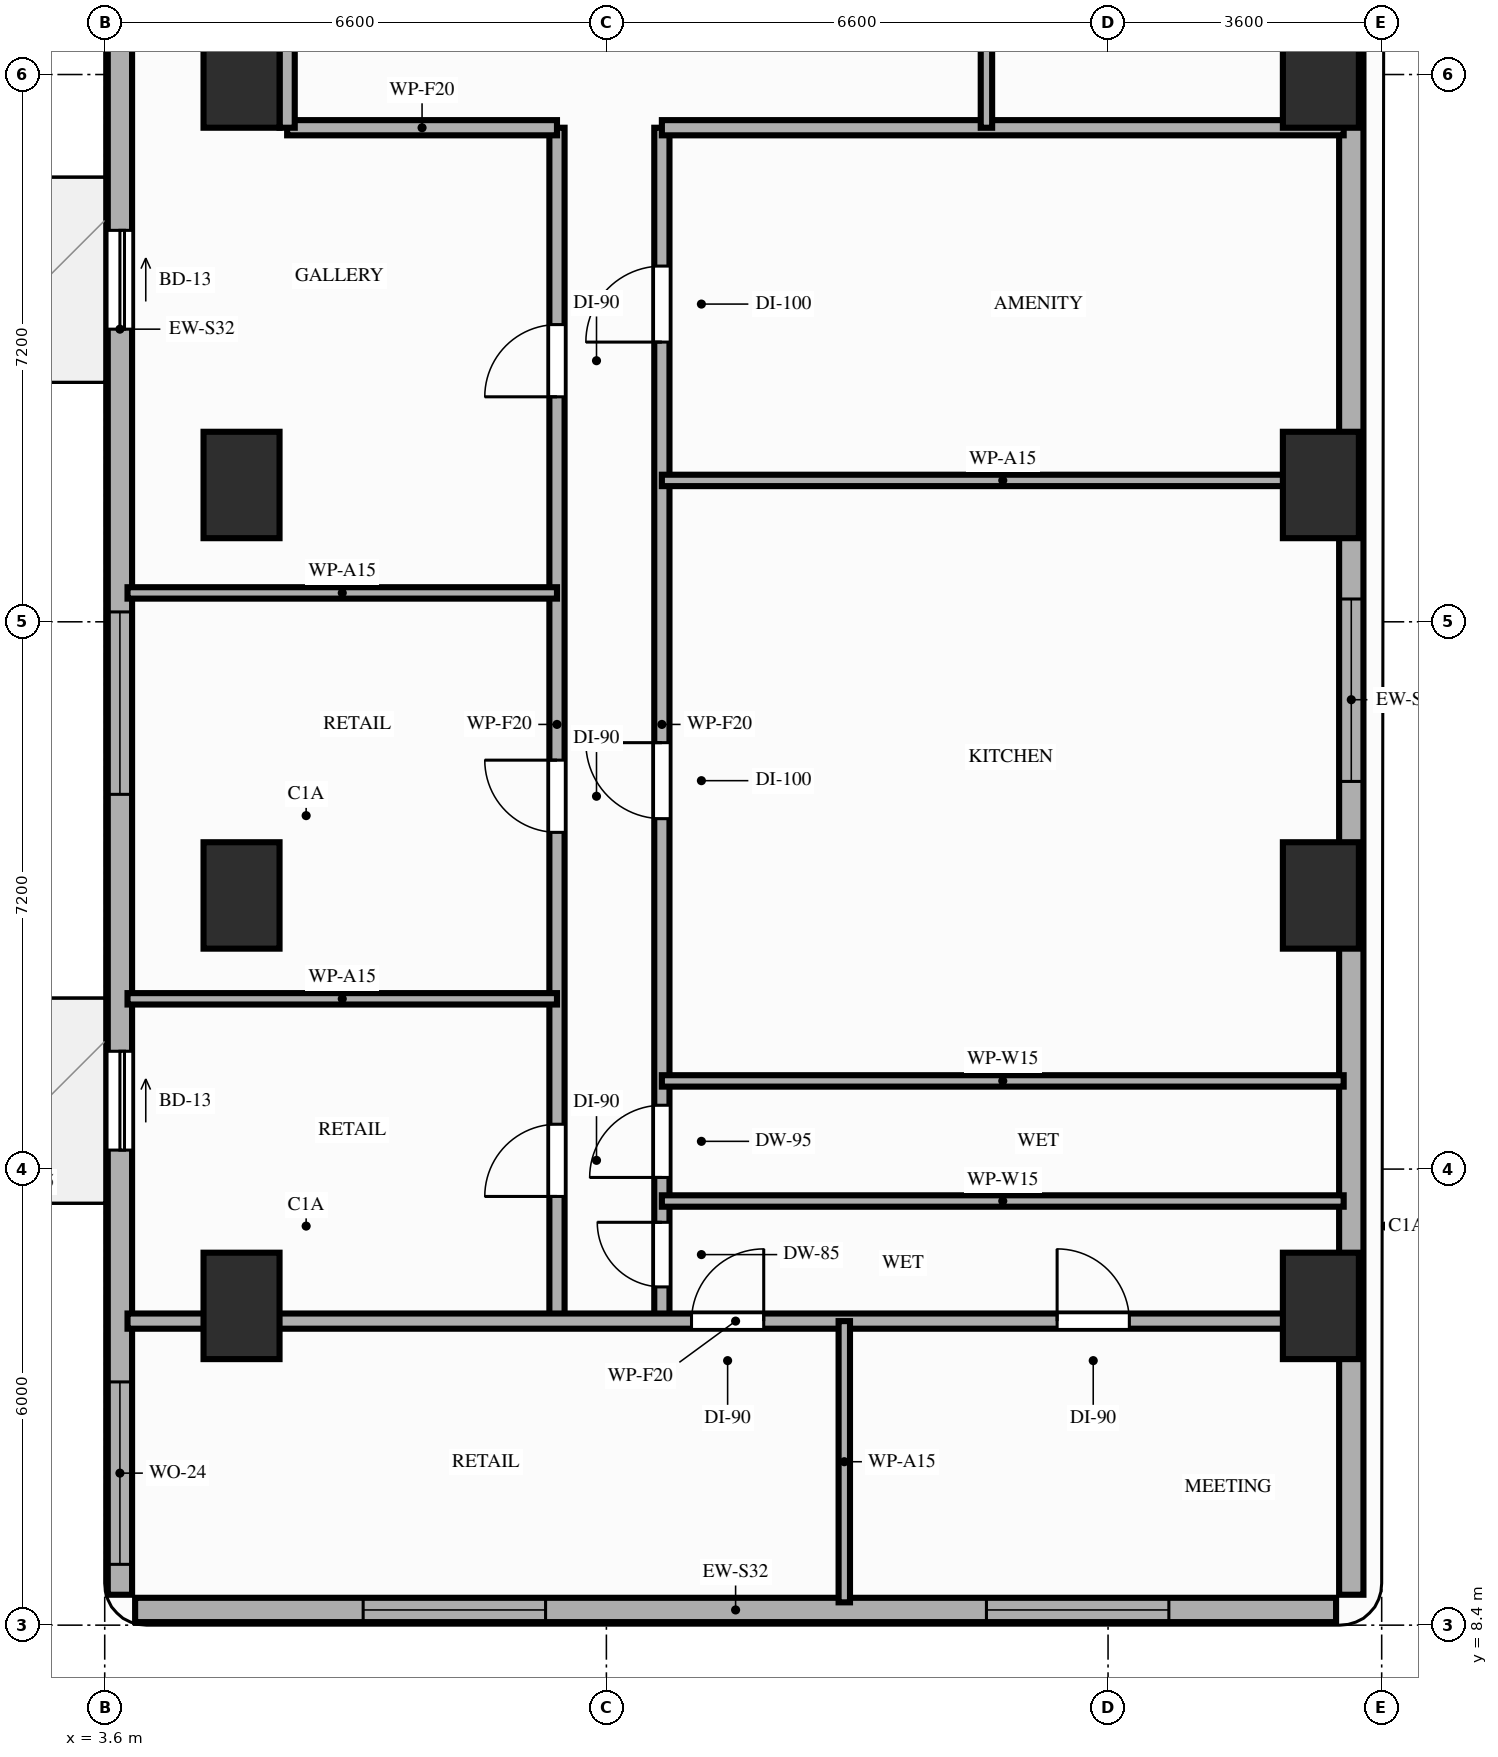
"""IFC4 building model, lengths in metres.
Left out: names, types, materials, properties, quantities, classifications, styles, units other than length and angle.
Written with IfcOpenShell. Run it as: python <this file> out.ifc"""

import sys

from ifc_helpers import new_model, si_unit, direction, frame, frame_2d, origin, origin_2d, place, context, subcontext, project, spatial, rectangle, extrude, element, fill, save


model = new_model("IFC4")
c1 = context("Model", 3, precision=1e-05, world=origin(), true_north=direction((0.0, 1.0)))
c2 = subcontext(c1, "Body", "Model", "MODEL_VIEW")
j1 = project(units=[si_unit("LENGTHUNIT", "METRE"), si_unit("PLANEANGLEUNIT", "RADIAN")], contexts=[c1])
p1 = place(None, origin())
s1 = spatial("IfcSite", under=j1, at=p1, CompositionType="ELEMENT")
p2 = place(p1, origin())
s2 = spatial("IfcBuilding", under=s1, at=p2, CompositionType="ELEMENT")
p3 = place(p2, frame((0.0, 0.0, 36.6)))
s3 = spatial("IfcBuildingStorey", under=s2, at=p3, CompositionType="ELEMENT", Elevation=36.6)
for number, where, z_axis, x_axis in (
    (1, (5.4, 12.6, 0.0), (0.0, 0.0, 1.0), (1.0, 0.0, 0.0)),
    (2, (19.6, 12.6, 0.0), (0.0, 0.0, 1.0), (1.0, 0.0, 0.0)),
    (3, (5.4, 18.0, 0.0), (0.0, 0.0, 1.0), (1.0, 0.0, 0.0)),
    (4, (19.6, 18.0, 0.0), (0.0, 0.0, 1.0), (1.0, 0.0, 0.0)),
    (5, (5.4, 23.4, 0.0), (0.0, 0.0, 1.0), (1.0, 0.0, 0.0)),
    (6, (19.6, 23.4, 0.0), (0.0, 0.0, 1.0), (1.0, 0.0, 0.0)),
    (7, (5.4, 28.8, 0.0), (0.0, 0.0, 1.0), (1.0, 0.0, 0.0)),
    (8, (19.6, 28.8, 0.0), (0.0, 0.0, 1.0), (1.0, 0.0, 0.0)),
):
    element("IfcColumn", number, at=place(p3, frame(where, z_axis=z_axis, x_axis=x_axis)), inside=s3, PredefinedType="COLUMN", context=c2, shape_type="SweptSolid", body=[
        extrude(rectangle(XDim=1.0, YDim=1.4, at=origin_2d()), origin(), (0.0, 0.0, 1.0), 3.2),
    ])
p4 = place(p3, frame((4.0, 8.6, 0.0), z_axis=(0.0, 0.0, 1.0), x_axis=(1.0, 0.0, 0.0)))
e9 = element("IfcWall", 9, at=p4, inside=s3, PredefinedType="STANDARD", context=c2, shape_type="SweptSolid", body=[
    extrude(rectangle(XDim=15.8, YDim=0.32, at=frame_2d((7.9, 0.0))), origin(), (0.0, 0.0, 1.0), 2.96),
])
p5 = place(p4, frame((3.0, 0.0, 0.85)))
e10 = element("IfcOpeningElement", 10, at=p5, cuts=e9, PredefinedType="OPENING", context=c2, shape_type="SweptSolid", body=[
    extrude(rectangle(XDim=2.4, YDim=1.8, at=frame_2d((1.2, 0.9))), frame((0.0, 0.17, 0.0), z_axis=(0.0, -1.0, 0.0), x_axis=(1.0, 0.0, 0.0)), (0.0, 0.0, 1.0), 0.34),
])
p6 = place(p4, frame((11.2, 0.0, 0.85)))
e11 = element("IfcOpeningElement", 11, at=p6, cuts=e9, PredefinedType="OPENING", context=c2, shape_type="SweptSolid", body=[
    extrude(rectangle(XDim=2.4, YDim=1.8, at=frame_2d((1.2, 0.9))), frame((0.0, 0.17, 0.0), z_axis=(0.0, -1.0, 0.0), x_axis=(1.0, 0.0, 0.0)), (0.0, 0.0, 1.0), 0.34),
])
p7 = place(p3, frame((3.8, 42.1, 0.0), z_axis=(0.0, 0.0, 1.0), x_axis=(0.0, -1.0, 0.0)))
e12 = element("IfcWall", 12, at=p7, inside=s3, PredefinedType="STANDARD", context=c2, shape_type="SweptSolid", body=[
    extrude(rectangle(XDim=33.3, YDim=0.32, at=frame_2d((16.65, 0.0))), origin(), (0.0, 0.0, 1.0), 2.67),
])
p8 = place(p7, frame((26.15, 0.0, 0.0)))
e13 = element("IfcOpeningElement", 13, at=p8, cuts=e12, PredefinedType="OPENING", context=c2, shape_type="SweptSolid", body=[
    extrude(rectangle(XDim=1.3, YDim=2.08, at=frame_2d((0.65, 1.04))), frame((0.0, 0.17, 0.0), z_axis=(0.0, -1.0, 0.0), x_axis=(1.0, 0.0, 0.0)), (0.0, 0.0, 1.0), 0.34),
])
p9 = place(p7, frame((15.35, 0.0, 0.0)))
e14 = element("IfcOpeningElement", 14, at=p9, cuts=e12, PredefinedType="OPENING", context=c2, shape_type="SweptSolid", body=[
    extrude(rectangle(XDim=1.3, YDim=2.08, at=frame_2d((0.65, 1.04))), frame((0.0, 0.17, 0.0), z_axis=(0.0, -1.0, 0.0), x_axis=(1.0, 0.0, 0.0)), (0.0, 0.0, 1.0), 0.34),
])
p10 = place(p7, frame((30.5, 0.0, 0.85)))
e15 = element("IfcOpeningElement", 15, at=p10, cuts=e12, PredefinedType="OPENING", context=c2, shape_type="SweptSolid", body=[
    extrude(rectangle(XDim=2.4, YDim=1.57, at=frame_2d((1.2, 0.785))), frame((0.0, 0.17, 0.0), z_axis=(0.0, -1.0, 0.0), x_axis=(1.0, 0.0, 0.0)), (0.0, 0.0, 1.0), 0.34),
])
p11 = place(p7, frame((20.37, 0.0, 0.85)))
e16 = element("IfcOpeningElement", 16, at=p11, cuts=e12, PredefinedType="OPENING", context=c2, shape_type="SweptSolid", body=[
    extrude(rectangle(XDim=2.4, YDim=1.57, at=frame_2d((1.2, 0.785))), frame((0.0, 0.17, 0.0), z_axis=(0.0, -1.0, 0.0), x_axis=(1.0, 0.0, 0.0)), (0.0, 0.0, 1.0), 0.34),
])
p12 = place(p7, frame((9.6, 0.0, 0.85)))
e17 = element("IfcOpeningElement", 17, at=p12, cuts=e12, PredefinedType="OPENING", context=c2, shape_type="SweptSolid", body=[
    extrude(rectangle(XDim=2.4, YDim=1.57, at=frame_2d((1.2, 0.785))), frame((0.0, 0.17, 0.0), z_axis=(0.0, -1.0, 0.0), x_axis=(1.0, 0.0, 0.0)), (0.0, 0.0, 1.0), 0.34),
])
p13 = place(p7, frame((3.5, 0.0, 0.85)))
e18 = element("IfcOpeningElement", 18, at=p13, cuts=e12, PredefinedType="OPENING", context=c2, shape_type="SweptSolid", body=[
    extrude(rectangle(XDim=2.4, YDim=1.57, at=frame_2d((1.2, 0.785))), frame((0.0, 0.17, 0.0), z_axis=(0.0, -1.0, 0.0), x_axis=(1.0, 0.0, 0.0)), (0.0, 0.0, 1.0), 0.34),
])
p14 = place(p3, frame((20.0, 8.8, 0.0), z_axis=(0.0, 0.0, 1.0), x_axis=(0.0, 1.0, 0.0)))
e19 = element("IfcWall", 19, at=p14, inside=s3, PredefinedType="STANDARD", context=c2, shape_type="SweptSolid", body=[
    extrude(rectangle(XDim=23.55, YDim=0.32, at=frame_2d((11.775, 0.0))), origin(), (0.0, 0.0, 1.0), 2.35),
])
p15 = place(p14, frame((10.7, 0.0, 0.85)))
e20 = element("IfcOpeningElement", 20, at=p15, cuts=e19, PredefinedType="OPENING", context=c2, shape_type="SweptSolid", body=[
    extrude(rectangle(XDim=2.4, YDim=1.25, at=frame_2d((1.2, 0.625))), frame((0.0, 0.17, 0.0), z_axis=(0.0, -1.0, 0.0), x_axis=(1.0, 0.0, 0.0)), (0.0, 0.0, 1.0), 0.34),
])
p16 = place(p3, frame((9.55, 12.4, 0.0), z_axis=(0.0, 0.0, 1.0), x_axis=(0.0, 1.0, 0.0)))
e21 = element("IfcWall", 21, at=p16, inside=s3, PredefinedType="PARTITIONING", context=c2, shape_type="SweptSolid", body=[
    extrude(rectangle(XDim=15.7, YDim=0.2, at=frame_2d((7.85, 0.0))), origin(), (0.0, 0.0, 1.0), 2.35),
])
p17 = place(p16, frame((1.64, 0.0, 0.0)))
e22 = element("IfcOpeningElement", 22, at=p17, cuts=e21, PredefinedType="OPENING", context=c2, shape_type="SweptSolid", body=[
    extrude(rectangle(XDim=0.95, YDim=2.15, at=frame_2d((0.475, 1.075))), frame((0.0, 0.11, 0.0), z_axis=(0.0, -1.0, 0.0), x_axis=(1.0, 0.0, 0.0)), (0.0, 0.0, 1.0), 0.22),
])
p18 = place(p16, frame((6.43, 0.0, 0.0)))
e23 = element("IfcOpeningElement", 23, at=p18, cuts=e21, PredefinedType="OPENING", context=c2, shape_type="SweptSolid", body=[
    extrude(rectangle(XDim=0.95, YDim=2.15, at=frame_2d((0.475, 1.075))), frame((0.0, 0.11, 0.0), z_axis=(0.0, -1.0, 0.0), x_axis=(1.0, 0.0, 0.0)), (0.0, 0.0, 1.0), 0.22),
])
p19 = place(p16, frame((12.16, 0.0, 0.0)))
e24 = element("IfcOpeningElement", 24, at=p19, cuts=e21, PredefinedType="OPENING", context=c2, shape_type="SweptSolid", body=[
    extrude(rectangle(XDim=0.95, YDim=2.15, at=frame_2d((0.475, 1.075))), frame((0.0, 0.11, 0.0), z_axis=(0.0, -1.0, 0.0), x_axis=(1.0, 0.0, 0.0)), (0.0, 0.0, 1.0), 0.22),
])
p20 = place(p3, frame((10.93, 12.4, 0.0), z_axis=(0.0, 0.0, 1.0), x_axis=(0.0, 1.0, 0.0)))
e25 = element("IfcWall", 25, at=p20, inside=s3, PredefinedType="PARTITIONING", context=c2, shape_type="SweptSolid", body=[
    extrude(rectangle(XDim=15.7, YDim=0.2, at=frame_2d((7.85, 0.0))), origin(), (0.0, 0.0, 1.0), 2.35),
])
p21 = place(p20, frame((0.45, 0.0, 0.0)))
e26 = element("IfcOpeningElement", 26, at=p21, cuts=e25, PredefinedType="OPENING", context=c2, shape_type="SweptSolid", body=[
    extrude(rectangle(XDim=0.85, YDim=2.1, at=frame_2d((0.425, 1.05))), frame((0.0, 0.11, 0.0), z_axis=(0.0, -1.0, 0.0), x_axis=(1.0, 0.0, 0.0)), (0.0, 0.0, 1.0), 0.22),
])
p22 = place(p20, frame((1.89, 0.0, 0.0)))
e27 = element("IfcOpeningElement", 27, at=p22, cuts=e25, PredefinedType="OPENING", context=c2, shape_type="SweptSolid", body=[
    extrude(rectangle(XDim=0.95, YDim=2.1, at=frame_2d((0.475, 1.05))), frame((0.0, 0.11, 0.0), z_axis=(0.0, -1.0, 0.0), x_axis=(1.0, 0.0, 0.0)), (0.0, 0.0, 1.0), 0.22),
])
p23 = place(p20, frame((6.61, 0.0, 0.0)))
e28 = element("IfcOpeningElement", 28, at=p23, cuts=e25, PredefinedType="OPENING", context=c2, shape_type="SweptSolid", body=[
    extrude(rectangle(XDim=1.0, YDim=2.15, at=frame_2d((0.5, 1.075))), frame((0.0, 0.11, 0.0), z_axis=(0.0, -1.0, 0.0), x_axis=(1.0, 0.0, 0.0)), (0.0, 0.0, 1.0), 0.22),
])
p24 = place(p20, frame((12.88, 0.0, 0.0)))
e29 = element("IfcOpeningElement", 29, at=p24, cuts=e25, PredefinedType="OPENING", context=c2, shape_type="SweptSolid", body=[
    extrude(rectangle(XDim=1.0, YDim=2.15, at=frame_2d((0.5, 1.075))), frame((0.0, 0.11, 0.0), z_axis=(0.0, -1.0, 0.0), x_axis=(1.0, 0.0, 0.0)), (0.0, 0.0, 1.0), 0.22),
])
p25 = place(p3, frame((3.9, 12.4, 0.0), z_axis=(0.0, 0.0, 1.0), x_axis=(1.0, 0.0, 0.0)))
e30 = element("IfcWall", 30, at=p25, inside=s3, PredefinedType="PARTITIONING", context=c2, shape_type="SweptSolid", body=[
    extrude(rectangle(XDim=16.0, YDim=0.2, at=frame_2d((8.0, 0.0))), origin(), (0.0, 0.0, 1.0), 2.35),
])
p26 = place(p25, frame((7.42, 0.0, 0.0)))
e31 = element("IfcOpeningElement", 31, at=p26, cuts=e30, PredefinedType="OPENING", context=c2, shape_type="SweptSolid", body=[
    extrude(rectangle(XDim=0.95, YDim=2.15, at=frame_2d((0.475, 1.075))), frame((0.0, 0.11, 0.0), z_axis=(0.0, -1.0, 0.0), x_axis=(1.0, 0.0, 0.0)), (0.0, 0.0, 1.0), 0.22),
])
p27 = place(p25, frame((12.23, 0.0, 0.0)))
e32 = element("IfcOpeningElement", 32, at=p27, cuts=e30, PredefinedType="OPENING", context=c2, shape_type="SweptSolid", body=[
    extrude(rectangle(XDim=0.95, YDim=2.15, at=frame_2d((0.475, 1.075))), frame((0.0, 0.11, 0.0), z_axis=(0.0, -1.0, 0.0), x_axis=(1.0, 0.0, 0.0)), (0.0, 0.0, 1.0), 0.22),
])
p28 = place(p3, frame((6.0, 28.1, 0.0), z_axis=(0.0, 0.0, 1.0), x_axis=(1.0, 0.0, 0.0)))
e33 = element("IfcWall", 33, at=p28, inside=s3, PredefinedType="PARTITIONING", context=c2, shape_type="SweptSolid", body=[
    extrude(rectangle(XDim=3.55, YDim=0.2, at=frame_2d((1.775, 0.0))), origin(), (0.0, 0.0, 1.0), 2.96),
])
p29 = place(p3, frame((6.0, 28.1, 0.0), z_axis=(0.0, 0.0, 1.0), x_axis=(0.0, 1.0, 0.0)))
e34 = element("IfcWall", 34, at=p29, inside=s3, PredefinedType="PARTITIONING", context=c2, shape_type="SweptSolid", body=[
    extrude(rectangle(XDim=5.58, YDim=0.2, at=frame_2d((2.79, 0.0))), origin(), (0.0, 0.0, 1.0), 2.35),
])
p30 = place(p3, frame((10.93, 28.1, 0.0), z_axis=(0.0, 0.0, 1.0), x_axis=(1.0, 0.0, 0.0)))
e35 = element("IfcWall", 35, at=p30, inside=s3, PredefinedType="PARTITIONING", context=c2, shape_type="SweptSolid", body=[
    extrude(rectangle(XDim=8.97, YDim=0.2, at=frame_2d((4.485, 0.0))), origin(), (0.0, 0.0, 1.0), 2.35),
])
p31 = place(p3, frame((15.2, 28.1, 0.0), z_axis=(0.0, 0.0, 1.0), x_axis=(0.0, 1.0, 0.0)))
e36 = element("IfcWall", 36, at=p31, inside=s3, PredefinedType="PARTITIONING", context=c2, shape_type="SweptSolid", body=[
    extrude(rectangle(XDim=3.3, YDim=0.15, at=frame_2d((1.65, 0.0))), origin(), (0.0, 0.0, 1.0), 2.35),
])
for number, where, z_axis, x_axis in (
    (37, (3.9, 16.64, 0.0), (0.0, 0.0, 1.0), (1.0, 0.0, 0.0)),
    (38, (3.9, 21.98, 0.0), (0.0, 0.0, 1.0), (1.0, 0.0, 0.0)),
):
    element("IfcWall", number, at=place(p3, frame(where, z_axis=z_axis, x_axis=x_axis)), inside=s3, PredefinedType="PARTITIONING", context=c2, shape_type="SweptSolid", body=[
        extrude(rectangle(XDim=5.65, YDim=0.15, at=frame_2d((2.825, 0.0))), origin(), (0.0, 0.0, 1.0), 2.35),
    ])
p32 = place(p3, frame((13.33, 8.7, 0.0), z_axis=(0.0, 0.0, 1.0), x_axis=(0.0, 1.0, 0.0)))
e39 = element("IfcWall", 39, at=p32, inside=s3, PredefinedType="PARTITIONING", context=c2, shape_type="SweptSolid", body=[
    extrude(rectangle(XDim=3.7, YDim=0.15, at=frame_2d((1.85, 0.0))), origin(), (0.0, 0.0, 1.0), 2.35),
])
for number, where, z_axis, x_axis in (
    (40, (10.93, 13.98, 0.0), (0.0, 0.0, 1.0), (1.0, 0.0, 0.0)),
    (41, (10.93, 15.56, 0.0), (0.0, 0.0, 1.0), (1.0, 0.0, 0.0)),
    (42, (10.93, 23.46, 0.0), (0.0, 0.0, 1.0), (1.0, 0.0, 0.0)),
):
    element("IfcWall", number, at=place(p3, frame(where, z_axis=z_axis, x_axis=x_axis)), inside=s3, PredefinedType="PARTITIONING", context=c2, shape_type="SweptSolid", body=[
        extrude(rectangle(XDim=8.97, YDim=0.15, at=frame_2d((4.485, 0.0))), origin(), (0.0, 0.0, 1.0), 2.35),
    ])
p33 = place(p8, origin())
e43 = element("IfcDoor", 43, at=p33, inside=s3, OperationType="SLIDING_TO_LEFT", PredefinedType="DOOR", context=c2, shape_type="SweptSolid", body=[
    extrude(rectangle(XDim=1.3, YDim=2.08, at=frame_2d((0.65, 1.04))), frame((0.0, 0.025, 0.0), z_axis=(0.0, -1.0, 0.0), x_axis=(1.0, 0.0, 0.0)), (0.0, 0.0, 1.0), 0.05),
])
fill(e13, e43)
p34 = place(p9, origin())
e44 = element("IfcDoor", 44, at=p34, inside=s3, OperationType="SLIDING_TO_LEFT", PredefinedType="DOOR", context=c2, shape_type="SweptSolid", body=[
    extrude(rectangle(XDim=1.3, YDim=2.08, at=frame_2d((0.65, 1.04))), frame((0.0, 0.025, 0.0), z_axis=(0.0, -1.0, 0.0), x_axis=(1.0, 0.0, 0.0)), (0.0, 0.0, 1.0), 0.05),
])
fill(e14, e44)
p35 = place(p10, origin())
e45 = element("IfcWindow", 45, at=p35, inside=s3, PartitioningType="SINGLE_PANEL", PredefinedType="WINDOW", context=c2, shape_type="SweptSolid", body=[
    extrude(rectangle(XDim=2.4, YDim=1.57, at=frame_2d((1.2, 0.785))), frame((0.0, 0.03, 0.0), z_axis=(0.0, -1.0, 0.0), x_axis=(1.0, 0.0, 0.0)), (0.0, 0.0, 1.0), 0.06),
])
fill(e15, e45)
p36 = place(p11, origin())
e46 = element("IfcWindow", 46, at=p36, inside=s3, PartitioningType="SINGLE_PANEL", PredefinedType="WINDOW", context=c2, shape_type="SweptSolid", body=[
    extrude(rectangle(XDim=2.4, YDim=1.57, at=frame_2d((1.2, 0.785))), frame((0.0, 0.03, 0.0), z_axis=(0.0, -1.0, 0.0), x_axis=(1.0, 0.0, 0.0)), (0.0, 0.0, 1.0), 0.06),
])
fill(e16, e46)
p37 = place(p15, origin())
e47 = element("IfcWindow", 47, at=p37, inside=s3, PartitioningType="SINGLE_PANEL", PredefinedType="WINDOW", context=c2, shape_type="SweptSolid", body=[
    extrude(rectangle(XDim=2.4, YDim=1.25, at=frame_2d((1.2, 0.625))), frame((0.0, 0.03, 0.0), z_axis=(0.0, -1.0, 0.0), x_axis=(1.0, 0.0, 0.0)), (0.0, 0.0, 1.0), 0.06),
])
fill(e20, e47)
p38 = place(p5, origin())
e48 = element("IfcWindow", 48, at=p38, inside=s3, PartitioningType="SINGLE_PANEL", PredefinedType="WINDOW", context=c2, shape_type="SweptSolid", body=[
    extrude(rectangle(XDim=2.4, YDim=1.8, at=frame_2d((1.2, 0.9))), frame((0.0, 0.03, 0.0), z_axis=(0.0, -1.0, 0.0), x_axis=(1.0, 0.0, 0.0)), (0.0, 0.0, 1.0), 0.06),
])
fill(e10, e48)
p39 = place(p6, origin())
e49 = element("IfcWindow", 49, at=p39, inside=s3, PartitioningType="SINGLE_PANEL", PredefinedType="WINDOW", context=c2, shape_type="SweptSolid", body=[
    extrude(rectangle(XDim=2.4, YDim=1.8, at=frame_2d((1.2, 0.9))), frame((0.0, 0.03, 0.0), z_axis=(0.0, -1.0, 0.0), x_axis=(1.0, 0.0, 0.0)), (0.0, 0.0, 1.0), 0.06),
])
fill(e11, e49)
p40 = place(p17, origin())
e50 = element("IfcDoor", 50, at=p40, inside=s3, OperationType="SINGLE_SWING_LEFT", PredefinedType="DOOR", context=c2, shape_type="SweptSolid", body=[
    extrude(rectangle(XDim=0.95, YDim=2.15, at=frame_2d((0.475, 1.075))), frame((0.0, 0.025, 0.0), z_axis=(0.0, -1.0, 0.0), x_axis=(1.0, 0.0, 0.0)), (0.0, 0.0, 1.0), 0.05),
])
fill(e22, e50)
p41 = place(p18, origin())
e51 = element("IfcDoor", 51, at=p41, inside=s3, OperationType="SINGLE_SWING_RIGHT", PredefinedType="DOOR", context=c2, shape_type="SweptSolid", body=[
    extrude(rectangle(XDim=0.95, YDim=2.15, at=frame_2d((0.475, 1.075))), frame((0.0, 0.025, 0.0), z_axis=(0.0, -1.0, 0.0), x_axis=(1.0, 0.0, 0.0)), (0.0, 0.0, 1.0), 0.05),
])
fill(e23, e51)
p42 = place(p19, origin())
e52 = element("IfcDoor", 52, at=p42, inside=s3, OperationType="SINGLE_SWING_LEFT", PredefinedType="DOOR", context=c2, shape_type="SweptSolid", body=[
    extrude(rectangle(XDim=0.95, YDim=2.15, at=frame_2d((0.475, 1.075))), frame((0.0, 0.025, 0.0), z_axis=(0.0, -1.0, 0.0), x_axis=(1.0, 0.0, 0.0)), (0.0, 0.0, 1.0), 0.05),
])
fill(e24, e52)
p43 = place(p26, origin())
e53 = element("IfcDoor", 53, at=p43, inside=s3, OperationType="SINGLE_SWING_RIGHT", PredefinedType="DOOR", context=c2, shape_type="SweptSolid", body=[
    extrude(rectangle(XDim=0.95, YDim=2.15, at=frame_2d((0.475, 1.075))), frame((0.0, 0.025, 0.0), z_axis=(0.0, -1.0, 0.0), x_axis=(1.0, 0.0, 0.0)), (0.0, 0.0, 1.0), 0.05),
])
fill(e31, e53)
p44 = place(p27, origin())
e54 = element("IfcDoor", 54, at=p44, inside=s3, OperationType="SINGLE_SWING_LEFT", PredefinedType="DOOR", context=c2, shape_type="SweptSolid", body=[
    extrude(rectangle(XDim=0.95, YDim=2.15, at=frame_2d((0.475, 1.075))), frame((0.0, 0.025, 0.0), z_axis=(0.0, -1.0, 0.0), x_axis=(1.0, 0.0, 0.0)), (0.0, 0.0, 1.0), 0.05),
])
fill(e32, e54)
p45 = place(p21, origin())
e55 = element("IfcDoor", 55, at=p45, inside=s3, OperationType="SINGLE_SWING_RIGHT", PredefinedType="DOOR", context=c2, shape_type="SweptSolid", body=[
    extrude(rectangle(XDim=0.85, YDim=2.1, at=frame_2d((0.425, 1.05))), frame((0.0, 0.025, 0.0), z_axis=(0.0, -1.0, 0.0), x_axis=(1.0, 0.0, 0.0)), (0.0, 0.0, 1.0), 0.05),
])
fill(e26, e55)
p46 = place(p22, origin())
e56 = element("IfcDoor", 56, at=p46, inside=s3, OperationType="SINGLE_SWING_LEFT", PredefinedType="DOOR", context=c2, shape_type="SweptSolid", body=[
    extrude(rectangle(XDim=0.95, YDim=2.1, at=frame_2d((0.475, 1.05))), frame((0.0, 0.025, 0.0), z_axis=(0.0, -1.0, 0.0), x_axis=(1.0, 0.0, 0.0)), (0.0, 0.0, 1.0), 0.05),
])
fill(e27, e56)
p47 = place(p23, origin())
e57 = element("IfcDoor", 57, at=p47, inside=s3, OperationType="SINGLE_SWING_RIGHT", PredefinedType="DOOR", context=c2, shape_type="SweptSolid", body=[
    extrude(rectangle(XDim=1.0, YDim=2.15, at=frame_2d((0.5, 1.075))), frame((0.0, 0.025, 0.0), z_axis=(0.0, -1.0, 0.0), x_axis=(1.0, 0.0, 0.0)), (0.0, 0.0, 1.0), 0.05),
])
fill(e28, e57)
p48 = place(p24, origin())
e58 = element("IfcDoor", 58, at=p48, inside=s3, OperationType="SINGLE_SWING_LEFT", PredefinedType="DOOR", context=c2, shape_type="SweptSolid", body=[
    extrude(rectangle(XDim=1.0, YDim=2.15, at=frame_2d((0.5, 1.075))), frame((0.0, 0.025, 0.0), z_axis=(0.0, -1.0, 0.0), x_axis=(1.0, 0.0, 0.0)), (0.0, 0.0, 1.0), 0.05),
])
fill(e29, e58)
save(model, sys.argv[1])
